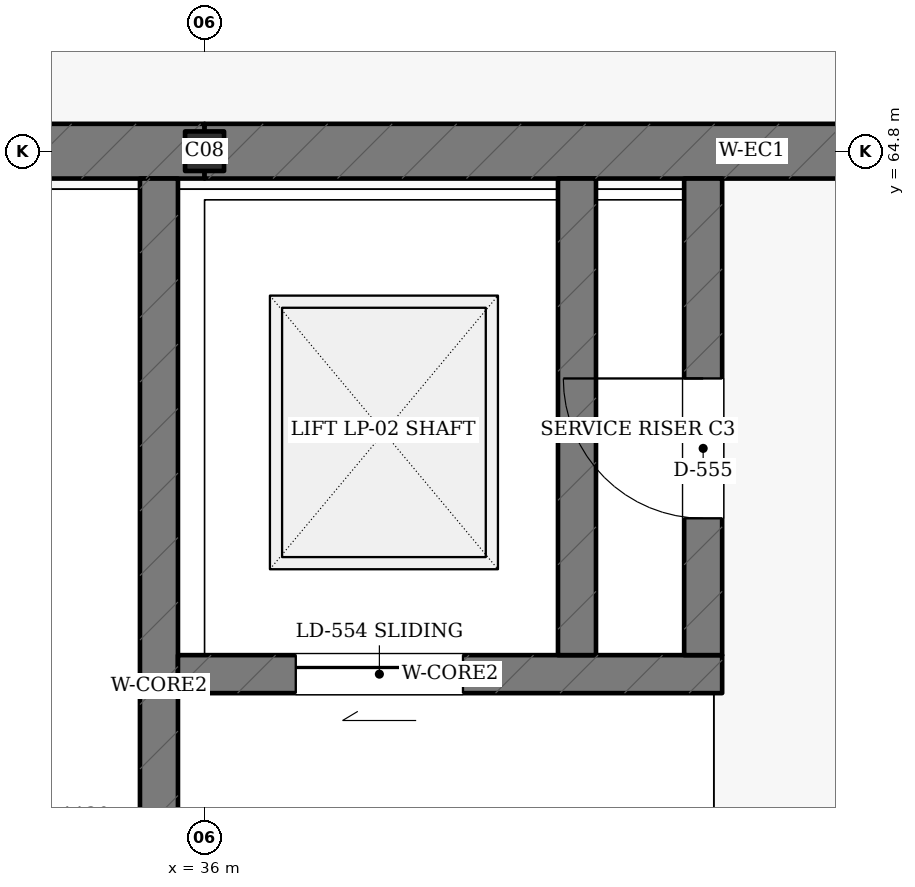
"""IFC4 building model, lengths in metres.
Left out: names, types, materials, properties, quantities, classifications, styles, units other than length and angle.
Written with IfcOpenShell. Run it as: python <this file> out.ifc"""

import sys

from ifc_helpers import new_model, si_unit, direction, frame, frame_2d, origin, origin_2d, place, context, subcontext, project, spatial, rectangle, i_section, extrude, element, fill, save


model = new_model("IFC4")
c1 = context("Model", 3, precision=1e-05, world=origin(), true_north=direction((0.0, 1.0)))
c2 = subcontext(c1, "Body", "Model", "MODEL_VIEW")
j1 = project(units=[si_unit("LENGTHUNIT", "METRE"), si_unit("PLANEANGLEUNIT", "RADIAN")], contexts=[c1])
p1 = place(None, origin())
s1 = spatial("IfcSite", under=j1, at=p1, CompositionType="ELEMENT")
p2 = place(p1, origin())
s2 = spatial("IfcBuilding", under=s1, at=p2, CompositionType="ELEMENT")
p3 = place(p2, frame((0.0, 0.0, 14.4)))
s3 = spatial("IfcBuildingStorey", under=s2, at=p3, CompositionType="ELEMENT", Elevation=14.4)
p4 = place(p3, frame((36.0, 64.8, 0.0), z_axis=(0.0, 0.0, 1.0), x_axis=(1.0, 0.0, 0.0)))
e1 = element("IfcColumn", 1, at=p4, inside=s3, PredefinedType="COLUMN", context=c2, shape_type="SweptSolid", body=[
    extrude(i_section(OverallWidth=0.256, OverallDepth=0.26, WebThickness=0.01, FlangeThickness=0.017, FilletRadius=0.013, at=origin_2d()), origin(), (0.0, 0.0, 1.0), 4.5),
])
p5 = place(p3, frame((28.8, 64.8, 0.0), z_axis=(0.0, 0.0, 1.0), x_axis=(1.0, 0.0, 0.0)))
e2 = element("IfcWall", 2, at=p5, inside=s3, PredefinedType="SHEAR", context=c2, shape_type="SweptSolid", body=[
    extrude(rectangle(XDim=7.2, YDim=0.36, at=frame_2d((3.6, 0.0))), origin(), (0.0, 0.0, 1.0), 3.414),
])
p6 = place(p3, frame((36.0, 64.8, 0.0), z_axis=(0.0, 0.0, 1.0), x_axis=(1.0, 0.0, 0.0)))
e3 = element("IfcWall", 3, at=p6, inside=s3, PredefinedType="SHEAR", context=c2, shape_type="SweptSolid", body=[
    extrude(rectangle(XDim=7.2, YDim=0.36, at=frame_2d((3.6, 0.0))), origin(), (0.0, 0.0, 1.0), 3.503),
])
p7 = place(p3, frame((35.7, 57.95, 0.0), z_axis=(0.0, 0.0, 1.0), x_axis=(0.0, 1.0, 0.0)))
e4 = element("IfcWall", 4, at=p7, inside=s3, PredefinedType="SHEAR", context=c2, shape_type="SweptSolid", body=[
    extrude(rectangle(XDim=6.67, YDim=0.25, at=frame_2d((3.335, 0.0))), origin(), (0.0, 0.0, 1.0), 3.6),
])
p8 = place(p7, frame((0.95, 0.0, 0.0)))
e5 = element("IfcOpeningElement", 5, at=p8, cuts=e4, PredefinedType="OPENING", context=c2, shape_type="SweptSolid", body=[
    extrude(rectangle(XDim=1.35, YDim=2.15, at=frame_2d((0.675, 1.075))), frame((0.0, 0.135, 0.0), z_axis=(0.0, -1.0, 0.0), x_axis=(1.0, 0.0, 0.0)), (0.0, 0.0, 1.0), 0.27),
])
p9 = place(p3, frame((35.825, 61.36, 0.0), z_axis=(0.0, 0.0, 1.0), x_axis=(1.0, 0.0, 0.0)))
e6 = element("IfcWall", 6, at=p9, inside=s3, PredefinedType="SHEAR", context=c2, shape_type="SweptSolid", body=[
    extrude(rectangle(XDim=3.58, YDim=0.25, at=frame_2d((1.79, 0.0))), origin(), (0.0, 0.0, 1.0), 3.6),
])
p10 = place(p9, frame((0.775, 0.0, 0.0)))
e7 = element("IfcOpeningElement", 7, at=p10, cuts=e6, PredefinedType="OPENING", context=c2, shape_type="SweptSolid", body=[
    extrude(rectangle(XDim=1.1, YDim=2.15, at=frame_2d((0.55, 1.075))), frame((0.0, 0.135, 0.0), z_axis=(0.0, -1.0, 0.0), x_axis=(1.0, 0.0, 0.0)), (0.0, 0.0, 1.0), 0.27),
])
p11 = place(p3, frame((38.45, 61.485, 0.0), z_axis=(0.0, 0.0, 1.0), x_axis=(0.0, 1.0, 0.0)))
e8 = element("IfcWall", 8, at=p11, inside=s3, PredefinedType="SHEAR", context=c2, shape_type="SweptSolid", body=[
    extrude(rectangle(XDim=3.135, YDim=0.25, at=frame_2d((1.567, 0.0))), origin(), (0.0, 0.0, 1.0), 3.6),
])
p12 = place(p3, frame((39.28, 61.485, 0.0), z_axis=(0.0, 0.0, 1.0), x_axis=(0.0, 1.0, 0.0)))
e9 = element("IfcWall", 9, at=p12, inside=s3, PredefinedType="SHEAR", context=c2, shape_type="SweptSolid", body=[
    extrude(rectangle(XDim=3.135, YDim=0.25, at=frame_2d((1.567, 0.0))), origin(), (0.0, 0.0, 1.0), 3.6),
])
p13 = place(p12, frame((0.9, 0.0, 0.0)))
e10 = element("IfcOpeningElement", 10, at=p13, cuts=e9, PredefinedType="OPENING", context=c2, shape_type="SweptSolid", body=[
    extrude(rectangle(XDim=0.92, YDim=2.05, at=frame_2d((0.46, 1.025))), frame((0.0, 0.135, 0.0), z_axis=(0.0, -1.0, 0.0), x_axis=(1.0, 0.0, 0.0)), (0.0, 0.0, 1.0), 0.27),
])
p14 = place(p10, origin())
e11 = element("IfcDoor", 11, at=p14, inside=s3, OperationType="SLIDING_TO_LEFT", PredefinedType="DOOR", context=c2, shape_type="SweptSolid", body=[
    extrude(rectangle(XDim=1.1, YDim=2.15, at=frame_2d((0.55, 1.075))), frame((0.0, 0.025, 0.0), z_axis=(0.0, -1.0, 0.0), x_axis=(1.0, 0.0, 0.0)), (0.0, 0.0, 1.0), 0.05),
])
fill(e7, e11)
p15 = place(p13, origin())
e12 = element("IfcDoor", 12, at=p15, inside=s3, OperationType="SINGLE_SWING_RIGHT", PredefinedType="DOOR", context=c2, shape_type="SweptSolid", body=[
    extrude(rectangle(XDim=0.92, YDim=2.05, at=frame_2d((0.46, 1.025))), frame((0.0, 0.025, 0.0), z_axis=(0.0, -1.0, 0.0), x_axis=(1.0, 0.0, 0.0)), (0.0, 0.0, 1.0), 0.05),
])
fill(e10, e12)
save(model, sys.argv[1])
